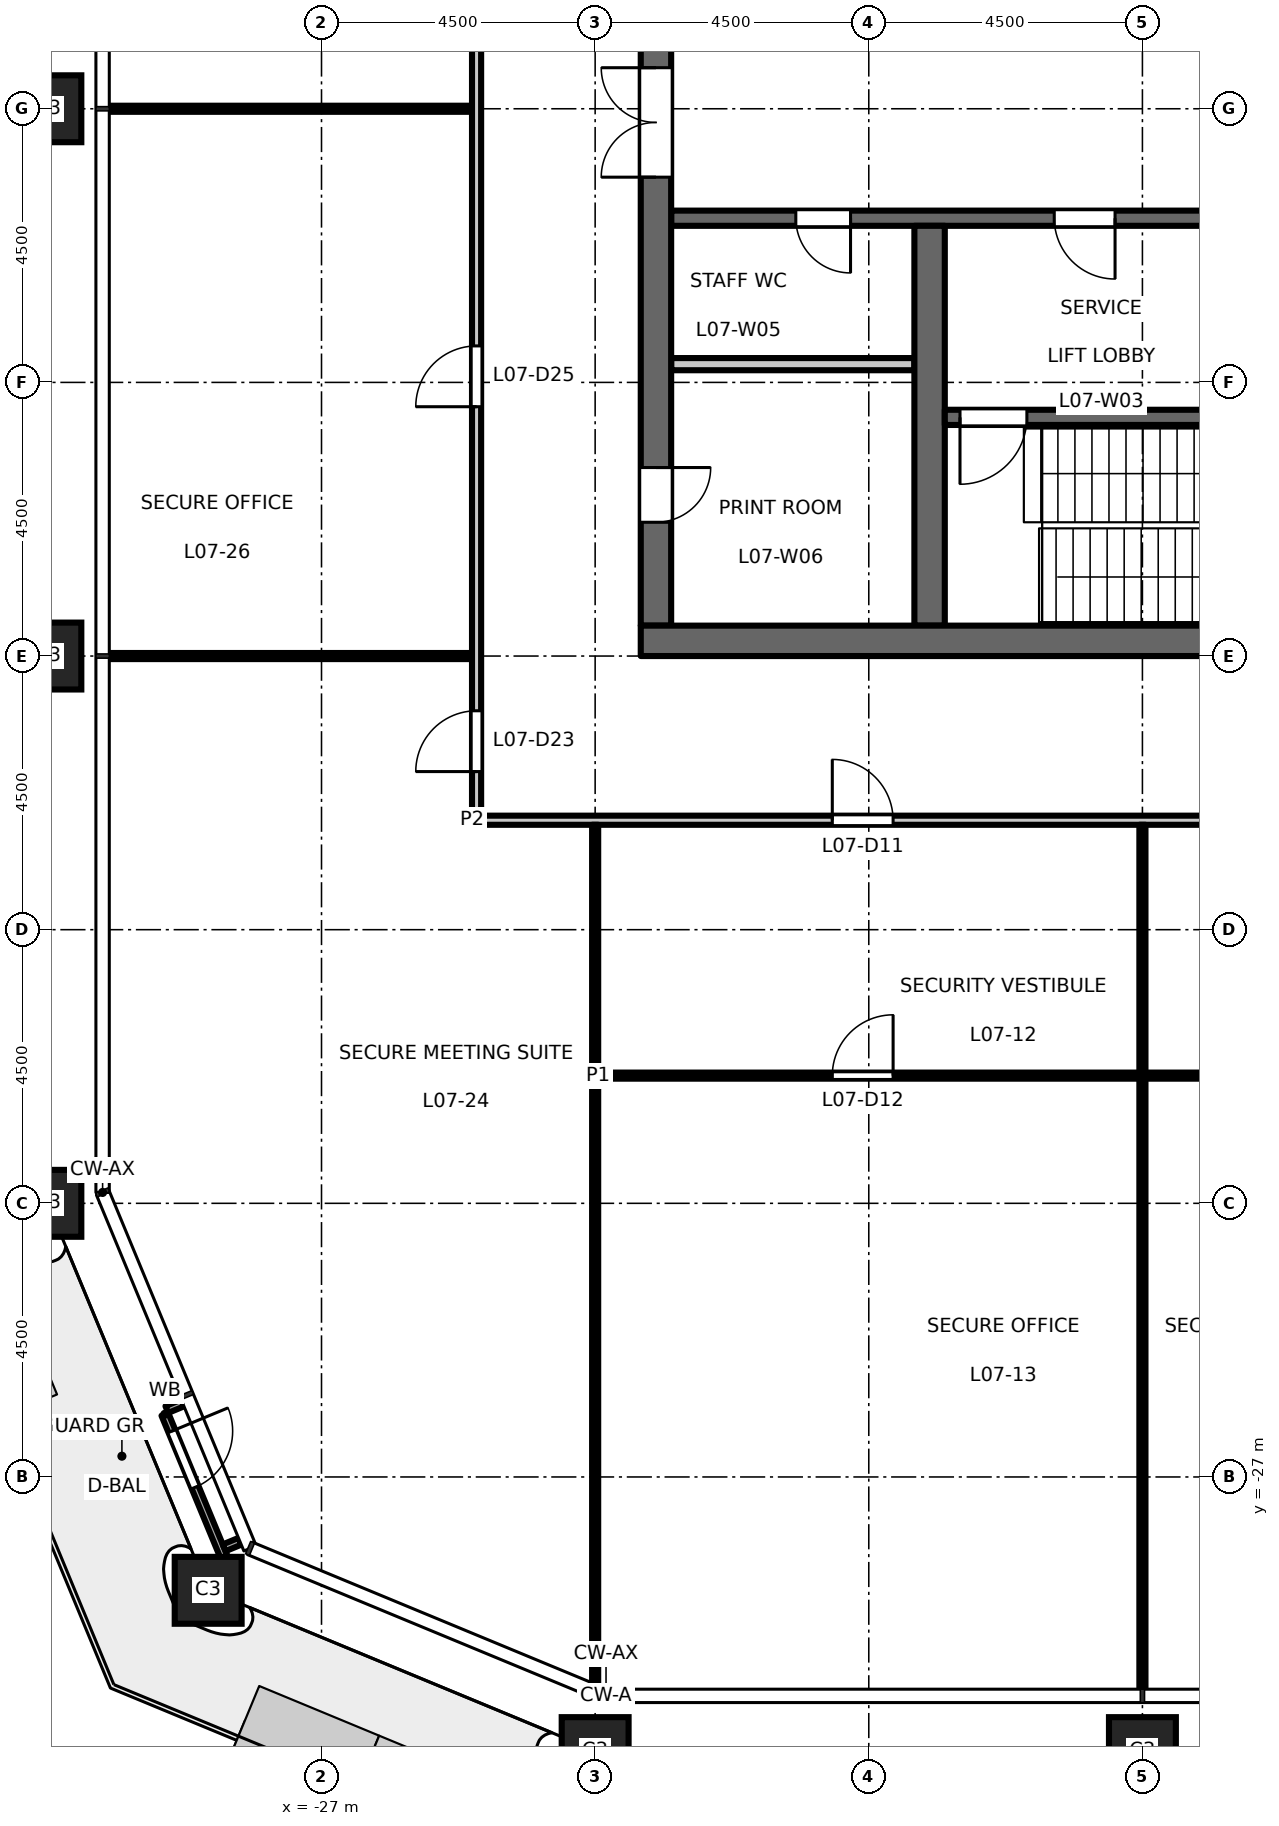
"""IFC4 building model, lengths in metres.
Left out: names, types, materials, properties, quantities, classifications, styles, units other than length and angle.
Written with IfcOpenShell. Run it as: python <this file> out.ifc"""

import sys

from ifc_helpers import new_model, si_unit, direction, frame, frame_2d, origin, origin_2d, place, context, subcontext, project, spatial, rectangle, hollow_rectangle, extrude, element, fill, save


model = new_model("IFC4")
c1 = context("Model", 3, precision=1e-05, world=origin(), true_north=direction((0.0, 1.0)))
c2 = subcontext(c1, "Body", "Model", "MODEL_VIEW")
j1 = project(units=[si_unit("LENGTHUNIT", "METRE"), si_unit("PLANEANGLEUNIT", "RADIAN")], contexts=[c1])
p1 = place(None, origin())
s1 = spatial("IfcSite", under=j1, at=p1, CompositionType="ELEMENT")
p2 = place(p1, origin())
s2 = spatial("IfcBuilding", under=s1, at=p2, CompositionType="ELEMENT")
p3 = place(p2, frame((0.0, 0.0, 35.7)))
s3 = spatial("IfcBuildingStorey", under=s2, at=p3, CompositionType="ELEMENT", Elevation=35.7)
for number, where, z_axis, x_axis in (
    (1, (-22.5, -31.5, 0.0), (0.0, 0.0, 1.0), (1.0, 0.0, 0.0)),
    (2, (-13.5, -31.5, 0.0), (0.0, 0.0, 1.0), (1.0, 0.0, 0.0)),
    (3, (-31.5, -4.5, 0.0), (0.0, 0.0, 1.0), (1.0, 0.0, 0.0)),
    (4, (-31.5, -13.5, 0.0), (0.0, 0.0, 1.0), (1.0, 0.0, 0.0)),
    (5, (-31.5, -22.5, 0.0), (0.0, 0.0, 1.0), (1.0, 0.0, 0.0)),
    (6, (-28.864, -28.864, 0.0), (0.0, 0.0, 1.0), (1.0, 0.0, 0.0)),
):
    element("IfcColumn", number, at=place(p3, frame(where, z_axis=z_axis, x_axis=x_axis)), inside=s3, PredefinedType="COLUMN", context=c2, shape_type="SweptSolid", body=[
        extrude(hollow_rectangle(XDim=1.1, YDim=1.1, WallThickness=0.07, at=origin_2d()), origin(), (0.0, 0.0, 1.0), 4.5),
    ])
p4 = place(p3, frame((-12.15, -6.3, 0.0), z_axis=(0.0, 0.0, 1.0), x_axis=(-1.0, 0.0, 0.0)))
e7 = element("IfcWall", 7, at=p4, inside=s3, PredefinedType="SHEAR", context=c2, shape_type="SweptSolid", body=[
    extrude(rectangle(XDim=9.1, YDim=0.25, at=frame_2d((4.55, 0.0))), origin(), (0.0, 0.0, 1.0), 4.35),
])
p5 = place(p4, frame((1.8, 0.0, 0.0)))
e8 = element("IfcOpeningElement", 8, at=p5, cuts=e7, PredefinedType="OPENING", context=c2, shape_type="SweptSolid", body=[
    extrude(rectangle(XDim=1.0, YDim=2.1, at=frame_2d((0.5, 1.05))), frame((0.0, 0.135, 0.0), z_axis=(0.0, -1.0, 0.0), x_axis=(1.0, 0.0, 0.0)), (0.0, 0.0, 1.0), 0.27),
])
p6 = place(p4, frame((6.15, 0.0, 0.0)))
e9 = element("IfcOpeningElement", 9, at=p6, cuts=e7, PredefinedType="OPENING", context=c2, shape_type="SweptSolid", body=[
    extrude(rectangle(XDim=0.9, YDim=2.1, at=frame_2d((0.45, 1.05))), frame((0.0, 0.135, 0.0), z_axis=(0.0, -1.0, 0.0), x_axis=(1.0, 0.0, 0.0)), (0.0, 0.0, 1.0), 0.27),
])
p7 = place(p3, frame((-21.5, -13.0, 0.0), z_axis=(0.0, 0.0, 1.0), x_axis=(0.0, 1.0, 0.0)))
e10 = element("IfcWall", 10, at=p7, inside=s3, PredefinedType="SHEAR", context=c2, shape_type="SweptSolid", body=[
    extrude(rectangle(XDim=26.0, YDim=0.5, at=frame_2d((13.0, 0.0))), origin(), (0.0, 0.0, 1.0), 4.35),
])
p8 = place(p7, frame((16.825, 0.0, 0.0)))
e11 = element("IfcOpeningElement", 11, at=p8, cuts=e10, PredefinedType="OPENING", context=c2, shape_type="SweptSolid", body=[
    extrude(rectangle(XDim=1.8, YDim=2.1, at=frame_2d((0.9, 1.05))), frame((0.0, 0.26, 0.0), z_axis=(0.0, -1.0, 0.0), x_axis=(1.0, 0.0, 0.0)), (0.0, 0.0, 1.0), 0.52),
])
p9 = place(p7, frame((7.375, 0.0, 0.0)))
e12 = element("IfcOpeningElement", 12, at=p9, cuts=e10, PredefinedType="OPENING", context=c2, shape_type="SweptSolid", body=[
    extrude(rectangle(XDim=1.8, YDim=2.1, at=frame_2d((0.9, 1.05))), frame((0.0, 0.26, 0.0), z_axis=(0.0, -1.0, 0.0), x_axis=(1.0, 0.0, 0.0)), (0.0, 0.0, 1.0), 0.52),
])
p10 = place(p7, frame((22.45, 0.0, 0.0)))
e13 = element("IfcOpeningElement", 13, at=p10, cuts=e10, PredefinedType="OPENING", context=c2, shape_type="SweptSolid", body=[
    extrude(rectangle(XDim=0.9, YDim=2.1, at=frame_2d((0.45, 1.05))), frame((0.0, 0.26, 0.0), z_axis=(0.0, -1.0, 0.0), x_axis=(1.0, 0.0, 0.0)), (0.0, 0.0, 1.0), 0.52),
])
p11 = place(p7, frame((1.7, 0.0, 0.0)))
e14 = element("IfcOpeningElement", 14, at=p11, cuts=e10, PredefinedType="OPENING", context=c2, shape_type="SweptSolid", body=[
    extrude(rectangle(XDim=0.9, YDim=2.1, at=frame_2d((0.45, 1.05))), frame((0.0, 0.26, 0.0), z_axis=(0.0, -1.0, 0.0), x_axis=(1.0, 0.0, 0.0)), (0.0, 0.0, 1.0), 0.52),
])
p12 = place(p3, frame((-17.25, -8.7, 0.0), z_axis=(0.0, 0.0, 1.0), x_axis=(-1.0, 0.0, 0.0)))
e15 = element("IfcWall", 15, at=p12, inside=s3, PredefinedType="PARTITIONING", context=c2, shape_type="SweptSolid", body=[
    extrude(rectangle(XDim=4.0, YDim=0.2, at=frame_2d((2.0, 0.0))), origin(), (0.0, 0.0, 1.0), 4.35),
])
p13 = place(p3, frame((-17.0, -13.0, 0.0), z_axis=(0.0, 0.0, 1.0), x_axis=(0.0, 1.0, 0.0)))
e16 = element("IfcWall", 16, at=p13, inside=s3, PredefinedType="SHEAR", context=c2, shape_type="SweptSolid", body=[
    extrude(rectangle(XDim=6.575, YDim=0.5, at=frame_2d((3.288, 0.0))), origin(), (0.0, 0.0, 1.0), 4.35),
])
p14 = place(p3, frame((-8.75, -9.575, 0.0), z_axis=(0.0, 0.0, 1.0), x_axis=(-1.0, 0.0, 0.0)))
e17 = element("IfcWall", 17, at=p14, inside=s3, PredefinedType="SHEAR", context=c2, shape_type="SweptSolid", body=[
    extrude(rectangle(XDim=8.0, YDim=0.25, at=frame_2d((4.0, 0.0))), origin(), (0.0, 0.0, 1.0), 4.35),
])
p15 = place(p14, frame((6.65, 0.0, 0.0)))
e18 = element("IfcOpeningElement", 18, at=p15, cuts=e17, PredefinedType="OPENING", context=c2, shape_type="SweptSolid", body=[
    extrude(rectangle(XDim=1.1, YDim=2.1, at=frame_2d((0.55, 1.05))), frame((0.0, 0.135, 0.0), z_axis=(0.0, -1.0, 0.0), x_axis=(1.0, 0.0, 0.0)), (0.0, 0.0, 1.0), 0.27),
])
p16 = place(p3, frame((-8.25, -13.25, 0.0), z_axis=(0.0, 0.0, 1.0), x_axis=(-1.0, 0.0, 0.0)))
e19 = element("IfcWall", 19, at=p16, inside=s3, PredefinedType="SHEAR", context=c2, shape_type="SweptSolid", body=[
    extrude(rectangle(XDim=13.5, YDim=0.5, at=frame_2d((6.75, 0.0))), origin(), (0.0, 0.0, 1.0), 4.35),
])
p17 = place(p3, frame((-29.285, -25.783, 0.0), z_axis=(0.0, 0.0, 1.0), x_axis=(-0.923772220778, -0.382942403136, 0.0)))
e20 = element("IfcWall", 20, at=p17, inside=s3, PredefinedType="STANDARD", context=c2, shape_type="SweptSolid", body=[
    extrude(rectangle(XDim=0.28, YDim=0.12, at=frame_2d((0.14, 0.0))), origin(), (0.0, 0.0, 1.0), 4.35),
])
p18 = place(p3, frame((-28.343, -28.058, 0.0), z_axis=(0.0, 0.0, 1.0), x_axis=(-0.923899985553, -0.382634050621, 0.0)))
e21 = element("IfcWall", 21, at=p18, inside=s3, PredefinedType="STANDARD", context=c2, shape_type="SweptSolid", body=[
    extrude(rectangle(XDim=0.28, YDim=0.12, at=frame_2d((0.14, 0.0))), origin(), (0.0, 0.0, 1.0), 4.35),
])
p19 = place(p3, frame((-29.576, -25.969, 0.0), z_axis=(0.0, 0.0, 1.0), x_axis=(0.382640634603, -0.923897258763, 0.0)))
e22 = element("IfcWall", 22, at=p19, inside=s3, PredefinedType="STANDARD", context=c2, shape_type="SweptSolid", body=[
    extrude(rectangle(XDim=2.538, YDim=0.12, at=frame_2d((1.269, 0.0))), origin(), (0.0, 0.0, 1.0), 4.35),
])
p20 = place(p19, frame((0.3, 0.0, 0.0)))
e23 = element("IfcOpeningElement", 23, at=p20, cuts=e22, PredefinedType="OPENING", context=c2, shape_type="SweptSolid", body=[
    extrude(rectangle(XDim=1.0, YDim=2.4, at=frame_2d((0.5, 1.2))), frame((0.0, 0.07, 0.0), z_axis=(0.0, -1.0, 0.0), x_axis=(1.0, 0.0, 0.0)), (0.0, 0.0, 1.0), 0.14),
])
p21 = place(p3, frame((-22.45, -20.4, 0.0), z_axis=(0.0, 0.0, 1.0), x_axis=(1.0, 0.0, 0.0)))
e24 = element("IfcWall", 24, at=p21, inside=s3, PredefinedType="PARTITIONING", context=c2, shape_type="SweptSolid", body=[
    extrude(rectangle(XDim=17.9, YDim=0.1, at=frame_2d((8.95, 0.0))), origin(), (0.0, 0.0, 1.0), 4.35),
])
p22 = place(p21, frame((3.85, 0.0, 0.0)))
e25 = element("IfcOpeningElement", 25, at=p22, cuts=e24, PredefinedType="OPENING", context=c2, shape_type="SweptSolid", body=[
    extrude(rectangle(XDim=1.0, YDim=2.1, at=frame_2d((0.5, 1.05))), frame((0.0, 0.06, 0.0), z_axis=(0.0, -1.0, 0.0), x_axis=(1.0, 0.0, 0.0)), (0.0, 0.0, 1.0), 0.12),
])
p23 = place(p21, frame((12.85, 0.0, 0.0)))
e26 = element("IfcOpeningElement", 26, at=p23, cuts=e24, PredefinedType="OPENING", context=c2, shape_type="SweptSolid", body=[
    extrude(rectangle(XDim=1.0, YDim=2.1, at=frame_2d((0.5, 1.05))), frame((0.0, 0.06, 0.0), z_axis=(0.0, -1.0, 0.0), x_axis=(1.0, 0.0, 0.0)), (0.0, 0.0, 1.0), 0.12),
])
p24 = place(p3, frame((-24.525, -16.2, 0.0), z_axis=(0.0, 0.0, 1.0), x_axis=(1.0, 0.0, 0.0)))
e27 = element("IfcWall", 27, at=p24, inside=s3, PredefinedType="PARTITIONING", context=c2, shape_type="SweptSolid", body=[
    extrude(rectangle(XDim=49.05, YDim=0.15, at=frame_2d((24.525, 0.0))), origin(), (0.0, 0.0, 1.0), 4.35),
])
p25 = place(p24, frame((5.925, 0.0, 0.0)))
e28 = element("IfcOpeningElement", 28, at=p25, cuts=e27, PredefinedType="OPENING", context=c2, shape_type="SweptSolid", body=[
    extrude(rectangle(XDim=1.0, YDim=2.1, at=frame_2d((0.5, 1.05))), frame((0.0, 0.085, 0.0), z_axis=(0.0, -1.0, 0.0), x_axis=(1.0, 0.0, 0.0)), (0.0, 0.0, 1.0), 0.17),
])
p26 = place(p24, frame((14.925, 0.0, 0.0)))
e29 = element("IfcOpeningElement", 29, at=p26, cuts=e27, PredefinedType="OPENING", context=c2, shape_type="SweptSolid", body=[
    extrude(rectangle(XDim=1.0, YDim=2.1, at=frame_2d((0.5, 1.05))), frame((0.0, 0.085, 0.0), z_axis=(0.0, -1.0, 0.0), x_axis=(1.0, 0.0, 0.0)), (0.0, 0.0, 1.0), 0.17),
])
p27 = place(p24, frame((23.925, 0.0, 0.0)))
e30 = element("IfcOpeningElement", 30, at=p27, cuts=e27, PredefinedType="OPENING", context=c2, shape_type="SweptSolid", body=[
    extrude(rectangle(XDim=1.0, YDim=2.1, at=frame_2d((0.5, 1.05))), frame((0.0, 0.085, 0.0), z_axis=(0.0, -1.0, 0.0), x_axis=(1.0, 0.0, 0.0)), (0.0, 0.0, 1.0), 0.17),
])
p28 = place(p24, frame((32.925, 0.0, 0.0)))
e31 = element("IfcOpeningElement", 31, at=p28, cuts=e27, PredefinedType="OPENING", context=c2, shape_type="SweptSolid", body=[
    extrude(rectangle(XDim=1.0, YDim=2.1, at=frame_2d((0.5, 1.05))), frame((0.0, 0.085, 0.0), z_axis=(0.0, -1.0, 0.0), x_axis=(1.0, 0.0, 0.0)), (0.0, 0.0, 1.0), 0.17),
])
p29 = place(p24, frame((41.925, 0.0, 0.0)))
e32 = element("IfcOpeningElement", 32, at=p29, cuts=e27, PredefinedType="OPENING", context=c2, shape_type="SweptSolid", body=[
    extrude(rectangle(XDim=1.0, YDim=2.1, at=frame_2d((0.5, 1.05))), frame((0.0, 0.085, 0.0), z_axis=(0.0, -1.0, 0.0), x_axis=(1.0, 0.0, 0.0)), (0.0, 0.0, 1.0), 0.17),
])
p30 = place(p3, frame((-30.51, -13.5, 0.0), z_axis=(0.0, 0.0, 1.0), x_axis=(1.0, 0.0, 0.0)))
e33 = element("IfcWall", 33, at=p30, inside=s3, PredefinedType="PARTITIONING", context=c2, shape_type="SweptSolid", body=[
    extrude(rectangle(XDim=5.985, YDim=0.1, at=frame_2d((2.993, 0.0))), origin(), (0.0, 0.0, 1.0), 3.35),
])
p31 = place(p3, frame((-30.51, -4.5, 0.0), z_axis=(0.0, 0.0, 1.0), x_axis=(1.0, 0.0, 0.0)))
e34 = element("IfcWall", 34, at=p31, inside=s3, PredefinedType="PARTITIONING", context=c2, shape_type="SweptSolid", body=[
    extrude(rectangle(XDim=5.985, YDim=0.1, at=frame_2d((2.993, 0.0))), origin(), (0.0, 0.0, 1.0), 4.35),
])
p32 = place(p3, frame((-24.45, -16.125, 0.0), z_axis=(0.0, 0.0, 1.0), x_axis=(0.0, 1.0, 0.0)))
e35 = element("IfcWall", 35, at=p32, inside=s3, PredefinedType="PARTITIONING", context=c2, shape_type="SweptSolid", body=[
    extrude(rectangle(XDim=32.25, YDim=0.15, at=frame_2d((16.125, 0.0))), origin(), (0.0, 0.0, 1.0), 4.35),
])
p33 = place(p32, frame((30.425, 0.0, 0.0)))
e36 = element("IfcOpeningElement", 36, at=p33, cuts=e35, PredefinedType="OPENING", context=c2, shape_type="SweptSolid", body=[
    extrude(rectangle(XDim=1.0, YDim=2.1, at=frame_2d((0.5, 1.05))), frame((0.0, 0.085, 0.0), z_axis=(0.0, -1.0, 0.0), x_axis=(1.0, 0.0, 0.0)), (0.0, 0.0, 1.0), 0.17),
])
p34 = place(p32, frame((0.725, 0.0, 0.0)))
e37 = element("IfcOpeningElement", 37, at=p34, cuts=e35, PredefinedType="OPENING", context=c2, shape_type="SweptSolid", body=[
    extrude(rectangle(XDim=1.0, YDim=2.1, at=frame_2d((0.5, 1.05))), frame((0.0, 0.085, 0.0), z_axis=(0.0, -1.0, 0.0), x_axis=(1.0, 0.0, 0.0)), (0.0, 0.0, 1.0), 0.17),
])
p35 = place(p32, frame((6.725, 0.0, 0.0)))
e38 = element("IfcOpeningElement", 38, at=p35, cuts=e35, PredefinedType="OPENING", context=c2, shape_type="SweptSolid", body=[
    extrude(rectangle(XDim=1.0, YDim=2.1, at=frame_2d((0.5, 1.05))), frame((0.0, 0.085, 0.0), z_axis=(0.0, -1.0, 0.0), x_axis=(1.0, 0.0, 0.0)), (0.0, 0.0, 1.0), 0.17),
])
p36 = place(p32, frame((15.725, 0.0, 0.0)))
e39 = element("IfcOpeningElement", 39, at=p36, cuts=e35, PredefinedType="OPENING", context=c2, shape_type="SweptSolid", body=[
    extrude(rectangle(XDim=1.0, YDim=2.1, at=frame_2d((0.5, 1.05))), frame((0.0, 0.085, 0.0), z_axis=(0.0, -1.0, 0.0), x_axis=(1.0, 0.0, 0.0)), (0.0, 0.0, 1.0), 0.17),
])
p37 = place(p32, frame((24.725, 0.0, 0.0)))
e40 = element("IfcOpeningElement", 40, at=p37, cuts=e35, PredefinedType="OPENING", context=c2, shape_type="SweptSolid", body=[
    extrude(rectangle(XDim=1.0, YDim=2.1, at=frame_2d((0.5, 1.05))), frame((0.0, 0.085, 0.0), z_axis=(0.0, -1.0, 0.0), x_axis=(1.0, 0.0, 0.0)), (0.0, 0.0, 1.0), 0.17),
])
p38 = place(p3, frame((-22.5, -30.428, 0.0), z_axis=(0.0, 0.0, 1.0), x_axis=(0.0, 1.0, 0.0)))
e41 = element("IfcWall", 41, at=p38, inside=s3, PredefinedType="PARTITIONING", context=c2, shape_type="SweptSolid", body=[
    extrude(rectangle(XDim=14.153, YDim=0.1, at=frame_2d((7.077, 0.0))), origin(), (0.0, 0.0, 1.0), 3.35),
])
p39 = place(p3, frame((-13.5, -30.51, 0.0), z_axis=(0.0, 0.0, 1.0), x_axis=(0.0, 1.0, 0.0)))
e42 = element("IfcWall", 42, at=p39, inside=s3, PredefinedType="PARTITIONING", context=c2, shape_type="SweptSolid", body=[
    extrude(rectangle(XDim=10.06, YDim=0.1, at=frame_2d((5.03, 0.0))), origin(), (0.0, 0.0, 1.0), 3.35),
])
p40 = place(p3, frame((-13.5, -20.35, 0.0), z_axis=(0.0, 0.0, 1.0), x_axis=(0.0, 1.0, 0.0)))
e43 = element("IfcWall", 43, at=p40, inside=s3, PredefinedType="PARTITIONING", context=c2, shape_type="SweptSolid", body=[
    extrude(rectangle(XDim=4.075, YDim=0.1, at=frame_2d((2.038, 0.0))), origin(), (0.0, 0.0, 1.0), 3.35),
])
p41 = place(p5, origin())
e44 = element("IfcDoor", 44, at=p41, inside=s3, OperationType="SINGLE_SWING_RIGHT", PredefinedType="DOOR", context=c2, shape_type="SweptSolid", body=[
    extrude(rectangle(XDim=1.0, YDim=2.1, at=frame_2d((0.5, 1.05))), frame((0.0, 0.025, 0.0), z_axis=(0.0, -1.0, 0.0), x_axis=(1.0, 0.0, 0.0)), (0.0, 0.0, 1.0), 0.05),
])
fill(e8, e44)
p42 = place(p15, origin())
e45 = element("IfcDoor", 45, at=p42, inside=s3, OperationType="SINGLE_SWING_LEFT", PredefinedType="DOOR", context=c2, shape_type="SweptSolid", body=[
    extrude(rectangle(XDim=1.1, YDim=2.1, at=frame_2d((0.55, 1.05))), frame((0.0, 0.025, 0.0), z_axis=(0.0, -1.0, 0.0), x_axis=(1.0, 0.0, 0.0)), (0.0, 0.0, 1.0), 0.05),
])
fill(e18, e45)
p43 = place(p9, origin())
e46 = element("IfcDoor", 46, at=p43, inside=s3, OperationType="DOUBLE_DOOR_DOUBLE_SWING", PredefinedType="DOOR", context=c2, shape_type="SweptSolid", body=[
    extrude(rectangle(XDim=1.8, YDim=2.1, at=frame_2d((0.9, 1.05))), frame((0.0, 0.025, 0.0), z_axis=(0.0, -1.0, 0.0), x_axis=(1.0, 0.0, 0.0)), (0.0, 0.0, 1.0), 0.05),
])
fill(e12, e46)
p44 = place(p6, origin())
e47 = element("IfcDoor", 47, at=p44, inside=s3, OperationType="SINGLE_SWING_RIGHT", PredefinedType="DOOR", context=c2, shape_type="SweptSolid", body=[
    extrude(rectangle(XDim=0.9, YDim=2.1, at=frame_2d((0.45, 1.05))), frame((0.0, 0.025, 0.0), z_axis=(0.0, -1.0, 0.0), x_axis=(1.0, 0.0, 0.0)), (0.0, 0.0, 1.0), 0.05),
])
fill(e9, e47)
p45 = place(p11, origin())
e48 = element("IfcDoor", 48, at=p45, inside=s3, OperationType="SINGLE_SWING_RIGHT", PredefinedType="DOOR", context=c2, shape_type="SweptSolid", body=[
    extrude(rectangle(XDim=0.9, YDim=2.1, at=frame_2d((0.45, 1.05))), frame((0.0, 0.025, 0.0), z_axis=(0.0, -1.0, 0.0), x_axis=(1.0, 0.0, 0.0)), (0.0, 0.0, 1.0), 0.05),
])
fill(e14, e48)
p46 = place(p20, origin())
e49 = element("IfcDoor", 49, at=p46, inside=s3, OperationType="SINGLE_SWING_LEFT", PredefinedType="DOOR", context=c2, shape_type="SweptSolid", body=[
    extrude(rectangle(XDim=1.0, YDim=2.4, at=frame_2d((0.5, 1.2))), frame((0.0, 0.025, 0.0), z_axis=(0.0, -1.0, 0.0), x_axis=(1.0, 0.0, 0.0)), (0.0, 0.0, 1.0), 0.05),
])
fill(e23, e49)
p47 = place(p25, origin())
e50 = element("IfcDoor", 50, at=p47, inside=s3, OperationType="SINGLE_SWING_LEFT", PredefinedType="DOOR", context=c2, shape_type="SweptSolid", body=[
    extrude(rectangle(XDim=1.0, YDim=2.1, at=frame_2d((0.5, 1.05))), frame((0.0, 0.025, 0.0), z_axis=(0.0, -1.0, 0.0), x_axis=(1.0, 0.0, 0.0)), (0.0, 0.0, 1.0), 0.05),
])
fill(e28, e50)
p48 = place(p22, origin())
e51 = element("IfcDoor", 51, at=p48, inside=s3, OperationType="SINGLE_SWING_RIGHT", PredefinedType="DOOR", context=c2, shape_type="SweptSolid", body=[
    extrude(rectangle(XDim=1.0, YDim=2.1, at=frame_2d((0.5, 1.05))), frame((0.0, 0.025, 0.0), z_axis=(0.0, -1.0, 0.0), x_axis=(1.0, 0.0, 0.0)), (0.0, 0.0, 1.0), 0.05),
])
fill(e25, e51)
p49 = place(p34, origin())
e52 = element("IfcDoor", 52, at=p49, inside=s3, OperationType="SINGLE_SWING_LEFT", PredefinedType="DOOR", context=c2, shape_type="SweptSolid", body=[
    extrude(rectangle(XDim=1.0, YDim=2.1, at=frame_2d((0.5, 1.05))), frame((0.0, 0.025, 0.0), z_axis=(0.0, -1.0, 0.0), x_axis=(1.0, 0.0, 0.0)), (0.0, 0.0, 1.0), 0.05),
])
fill(e37, e52)
p50 = place(p35, origin())
e53 = element("IfcDoor", 53, at=p50, inside=s3, OperationType="SINGLE_SWING_LEFT", PredefinedType="DOOR", context=c2, shape_type="SweptSolid", body=[
    extrude(rectangle(XDim=1.0, YDim=2.1, at=frame_2d((0.5, 1.05))), frame((0.0, 0.025, 0.0), z_axis=(0.0, -1.0, 0.0), x_axis=(1.0, 0.0, 0.0)), (0.0, 0.0, 1.0), 0.05),
])
fill(e38, e53)
save(model, sys.argv[1])
